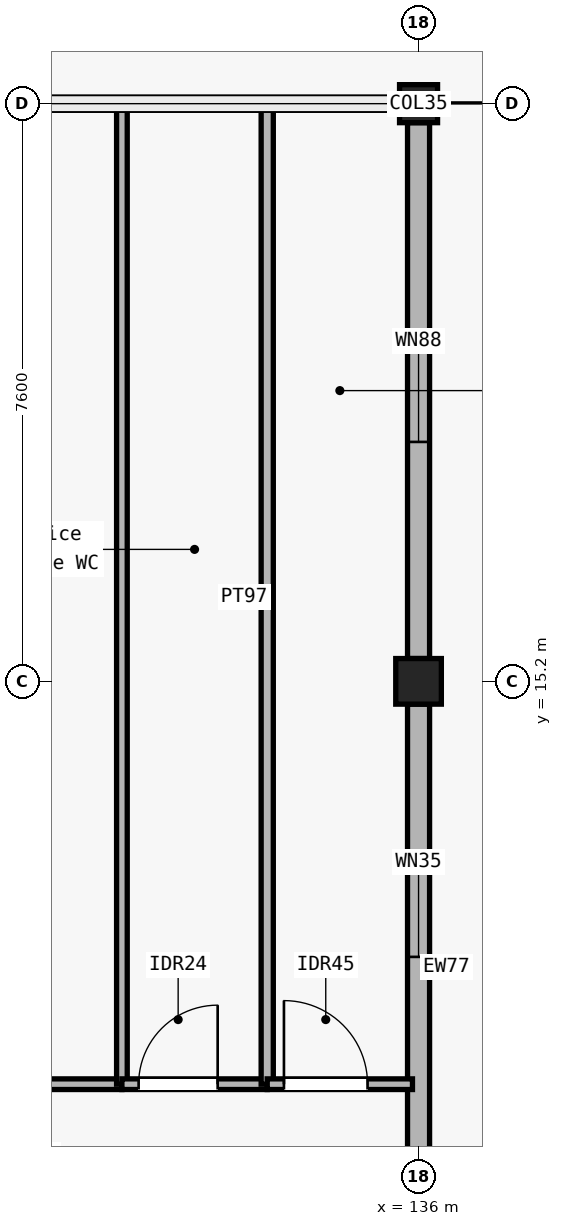
"""IFC4 building model, lengths in metres.
Left out: names, types, materials, properties, quantities, classifications, styles, units other than length and angle.
Written with IfcOpenShell. Run it as: python <this file> out.ifc"""

import sys

from ifc_helpers import new_model, si_unit, direction, frame, frame_2d, origin, origin_2d, place, context, subcontext, project, spatial, rectangle, extrude, element, fill, save


model = new_model("IFC4")
c1 = context("Model", 3, precision=1e-05, world=origin(), true_north=direction((0.0, 1.0)))
c2 = subcontext(c1, "Body", "Model", "MODEL_VIEW")
j1 = project(units=[si_unit("LENGTHUNIT", "METRE"), si_unit("PLANEANGLEUNIT", "RADIAN")], contexts=[c1])
p1 = place(None, origin())
s1 = spatial("IfcSite", under=j1, at=p1, CompositionType="ELEMENT")
p2 = place(p1, origin())
s2 = spatial("IfcBuilding", under=s1, at=p2, CompositionType="ELEMENT")
p3 = place(p2, origin())
s3 = spatial("IfcBuildingStorey", under=s2, at=p3, CompositionType="ELEMENT", Elevation=0.0)
p4 = place(p3, frame((136.0, 15.2, 0.0), z_axis=(0.0, 0.0, 1.0), x_axis=(1.0, 0.0, 0.0)))
e1 = element("IfcColumn", 1, at=p4, inside=s3, PredefinedType="COLUMN", context=c2, shape_type="SweptSolid", body=[
    extrude(rectangle(XDim=0.6, YDim=0.6, at=origin_2d()), origin(), (0.0, 0.0, 1.0), 5.4),
])
p5 = place(p3, frame((136.0, 22.8, 0.0), z_axis=(0.0, 0.0, 1.0), x_axis=(1.0, 0.0, 0.0)))
e2 = element("IfcColumn", 2, at=p5, inside=s3, PredefinedType="COLUMN", context=c2, shape_type="SweptSolid", body=[
    extrude(rectangle(XDim=0.5, YDim=0.5, at=origin_2d()), origin(), (0.0, 0.0, 1.0), 5.4),
])
p6 = place(p3, frame((136.0, 14.9, 0.0), z_axis=(0.0, 0.0, 1.0), x_axis=(0.0, -1.0, 0.0)))
e3 = element("IfcWall", 3, at=p6, inside=s3, PredefinedType="SOLIDWALL", context=c2, shape_type="SweptSolid", body=[
    extrude(rectangle(XDim=6.925, YDim=0.29, at=frame_2d((3.462, 0.0))), origin(), (0.0, 0.0, 1.0), 4.44),
])
p7 = place(p6, frame((2.125, 0.0, 0.95)))
e4 = element("IfcOpeningElement", 4, at=p7, cuts=e3, PredefinedType="OPENING", context=c2, shape_type="SweptSolid", body=[
    extrude(rectangle(XDim=1.2, YDim=1.5, at=frame_2d((0.6, 0.75))), frame((0.0, 0.155, 0.0), z_axis=(0.0, -1.0, 0.0), x_axis=(1.0, 0.0, 0.0)), (0.0, 0.0, 1.0), 0.31),
])
p8 = place(p3, frame((136.0, 22.55, 0.0), z_axis=(0.0, 0.0, 1.0), x_axis=(0.0, -1.0, 0.0)))
e5 = element("IfcWall", 5, at=p8, inside=s3, PredefinedType="SOLIDWALL", context=c2, shape_type="SweptSolid", body=[
    extrude(rectangle(XDim=7.05, YDim=0.29, at=frame_2d((3.525, 0.0))), origin(), (0.0, 0.0, 1.0), 4.44),
])
p9 = place(p8, frame((2.85, 0.0, 0.95)))
e6 = element("IfcOpeningElement", 6, at=p9, cuts=e5, PredefinedType="OPENING", context=c2, shape_type="SweptSolid", body=[
    extrude(rectangle(XDim=1.35, YDim=1.5, at=frame_2d((0.675, 0.75))), frame((0.0, 0.155, 0.0), z_axis=(0.0, -1.0, 0.0), x_axis=(1.0, 0.0, 0.0)), (0.0, 0.0, 1.0), 0.31),
])
p10 = place(p3, frame((104.327, 9.9, 0.0), z_axis=(0.0, 0.0, 1.0), x_axis=(1.0, 0.0, 0.0)))
e7 = element("IfcWall", 7, at=p10, inside=s3, PredefinedType="PARTITIONING", context=c2, shape_type="SweptSolid", body=[
    extrude(rectangle(XDim=27.77, YDim=0.14, at=frame_2d((13.885, 0.0))), origin(), (0.0, 0.0, 1.0), 4.4),
])
p11 = place(p10, frame((2.853, 0.0, 0.0)))
e8 = element("IfcOpeningElement", 8, at=p11, cuts=e7, PredefinedType="OPENING", context=c2, shape_type="SweptSolid", body=[
    extrude(rectangle(XDim=0.98, YDim=2.15, at=frame_2d((0.49, 1.075))), frame((0.0, 0.08, 0.0), z_axis=(0.0, -1.0, 0.0), x_axis=(1.0, 0.0, 0.0)), (0.0, 0.0, 1.0), 0.16),
])
p12 = place(p3, frame((132.097, 9.9, 0.0), z_axis=(0.0, 0.0, 1.0), x_axis=(0.0, 1.0, 0.0)))
e9 = element("IfcWall", 9, at=p12, inside=s3, PredefinedType="PARTITIONING", context=c2, shape_type="SweptSolid", body=[
    extrude(rectangle(XDim=12.82, YDim=0.14, at=frame_2d((6.41, 0.0))), origin(), (0.0, 0.0, 1.0), 3.29),
])
p13 = place(p3, frame((132.097, 9.9, 0.0), z_axis=(0.0, 0.0, 1.0), x_axis=(1.0, 0.0, 0.0)))
e10 = element("IfcWall", 10, at=p13, inside=s3, PredefinedType="PARTITIONING", context=c2, shape_type="SweptSolid", body=[
    extrude(rectangle(XDim=1.912, YDim=0.14, at=frame_2d((0.956, 0.0))), origin(), (0.0, 0.0, 1.0), 4.5),
])
p14 = place(p13, frame((0.22, 0.0, 0.0)))
e11 = element("IfcOpeningElement", 11, at=p14, cuts=e10, PredefinedType="OPENING", context=c2, shape_type="SweptSolid", body=[
    extrude(rectangle(XDim=1.04, YDim=2.15, at=frame_2d((0.52, 1.075))), frame((0.0, 0.08, 0.0), z_axis=(0.0, -1.0, 0.0), x_axis=(1.0, 0.0, 0.0)), (0.0, 0.0, 1.0), 0.16),
])
p15 = place(p3, frame((134.009, 9.9, 0.0), z_axis=(0.0, 0.0, 1.0), x_axis=(0.0, 1.0, 0.0)))
e12 = element("IfcWall", 12, at=p15, inside=s3, PredefinedType="PARTITIONING", context=c2, shape_type="SweptSolid", body=[
    extrude(rectangle(XDim=12.82, YDim=0.16, at=frame_2d((6.41, 0.0))), origin(), (0.0, 0.0, 1.0), 3.29),
])
p16 = place(p3, frame((134.009, 9.9, 0.0), z_axis=(0.0, 0.0, 1.0), x_axis=(1.0, 0.0, 0.0)))
e13 = element("IfcWall", 13, at=p16, inside=s3, PredefinedType="PARTITIONING", context=c2, shape_type="SweptSolid", body=[
    extrude(rectangle(XDim=1.911, YDim=0.14, at=frame_2d((0.956, 0.0))), origin(), (0.0, 0.0, 1.0), 4.325),
])
p17 = place(p16, frame((0.22, 0.0, 0.0)))
e14 = element("IfcOpeningElement", 14, at=p17, cuts=e13, PredefinedType="OPENING", context=c2, shape_type="SweptSolid", body=[
    extrude(rectangle(XDim=1.1, YDim=2.15, at=frame_2d((0.55, 1.075))), frame((0.0, 0.08, 0.0), z_axis=(0.0, -1.0, 0.0), x_axis=(1.0, 0.0, 0.0)), (0.0, 0.0, 1.0), 0.16),
])
p18 = place(p7, origin())
e15 = element("IfcWindow", 15, at=p18, inside=s3, PartitioningType="SINGLE_PANEL", PredefinedType="WINDOW", context=c2, shape_type="SweptSolid", body=[
    extrude(rectangle(XDim=1.2, YDim=1.5, at=frame_2d((0.6, 0.75))), frame((0.0, 0.03, 0.0), z_axis=(0.0, -1.0, 0.0), x_axis=(1.0, 0.0, 0.0)), (0.0, 0.0, 1.0), 0.06),
])
fill(e4, e15)
p19 = place(p9, origin())
e16 = element("IfcWindow", 16, at=p19, inside=s3, PartitioningType="SINGLE_PANEL", PredefinedType="WINDOW", context=c2, shape_type="SweptSolid", body=[
    extrude(rectangle(XDim=1.35, YDim=1.5, at=frame_2d((0.675, 0.75))), frame((0.0, 0.03, 0.0), z_axis=(0.0, -1.0, 0.0), x_axis=(1.0, 0.0, 0.0)), (0.0, 0.0, 1.0), 0.06),
])
fill(e6, e16)
p20 = place(p14, origin())
e17 = element("IfcDoor", 17, at=p20, inside=s3, OperationType="SINGLE_SWING_RIGHT", PredefinedType="DOOR", context=c2, shape_type="SweptSolid", body=[
    extrude(rectangle(XDim=1.04, YDim=2.15, at=frame_2d((0.52, 1.075))), frame((0.0, 0.025, 0.0), z_axis=(0.0, -1.0, 0.0), x_axis=(1.0, 0.0, 0.0)), (0.0, 0.0, 1.0), 0.05),
])
fill(e11, e17)
p21 = place(p17, origin())
e18 = element("IfcDoor", 18, at=p21, inside=s3, OperationType="SINGLE_SWING_LEFT", PredefinedType="DOOR", context=c2, shape_type="SweptSolid", body=[
    extrude(rectangle(XDim=1.1, YDim=2.15, at=frame_2d((0.55, 1.075))), frame((0.0, 0.025, 0.0), z_axis=(0.0, -1.0, 0.0), x_axis=(1.0, 0.0, 0.0)), (0.0, 0.0, 1.0), 0.05),
])
fill(e14, e18)
save(model, sys.argv[1])
